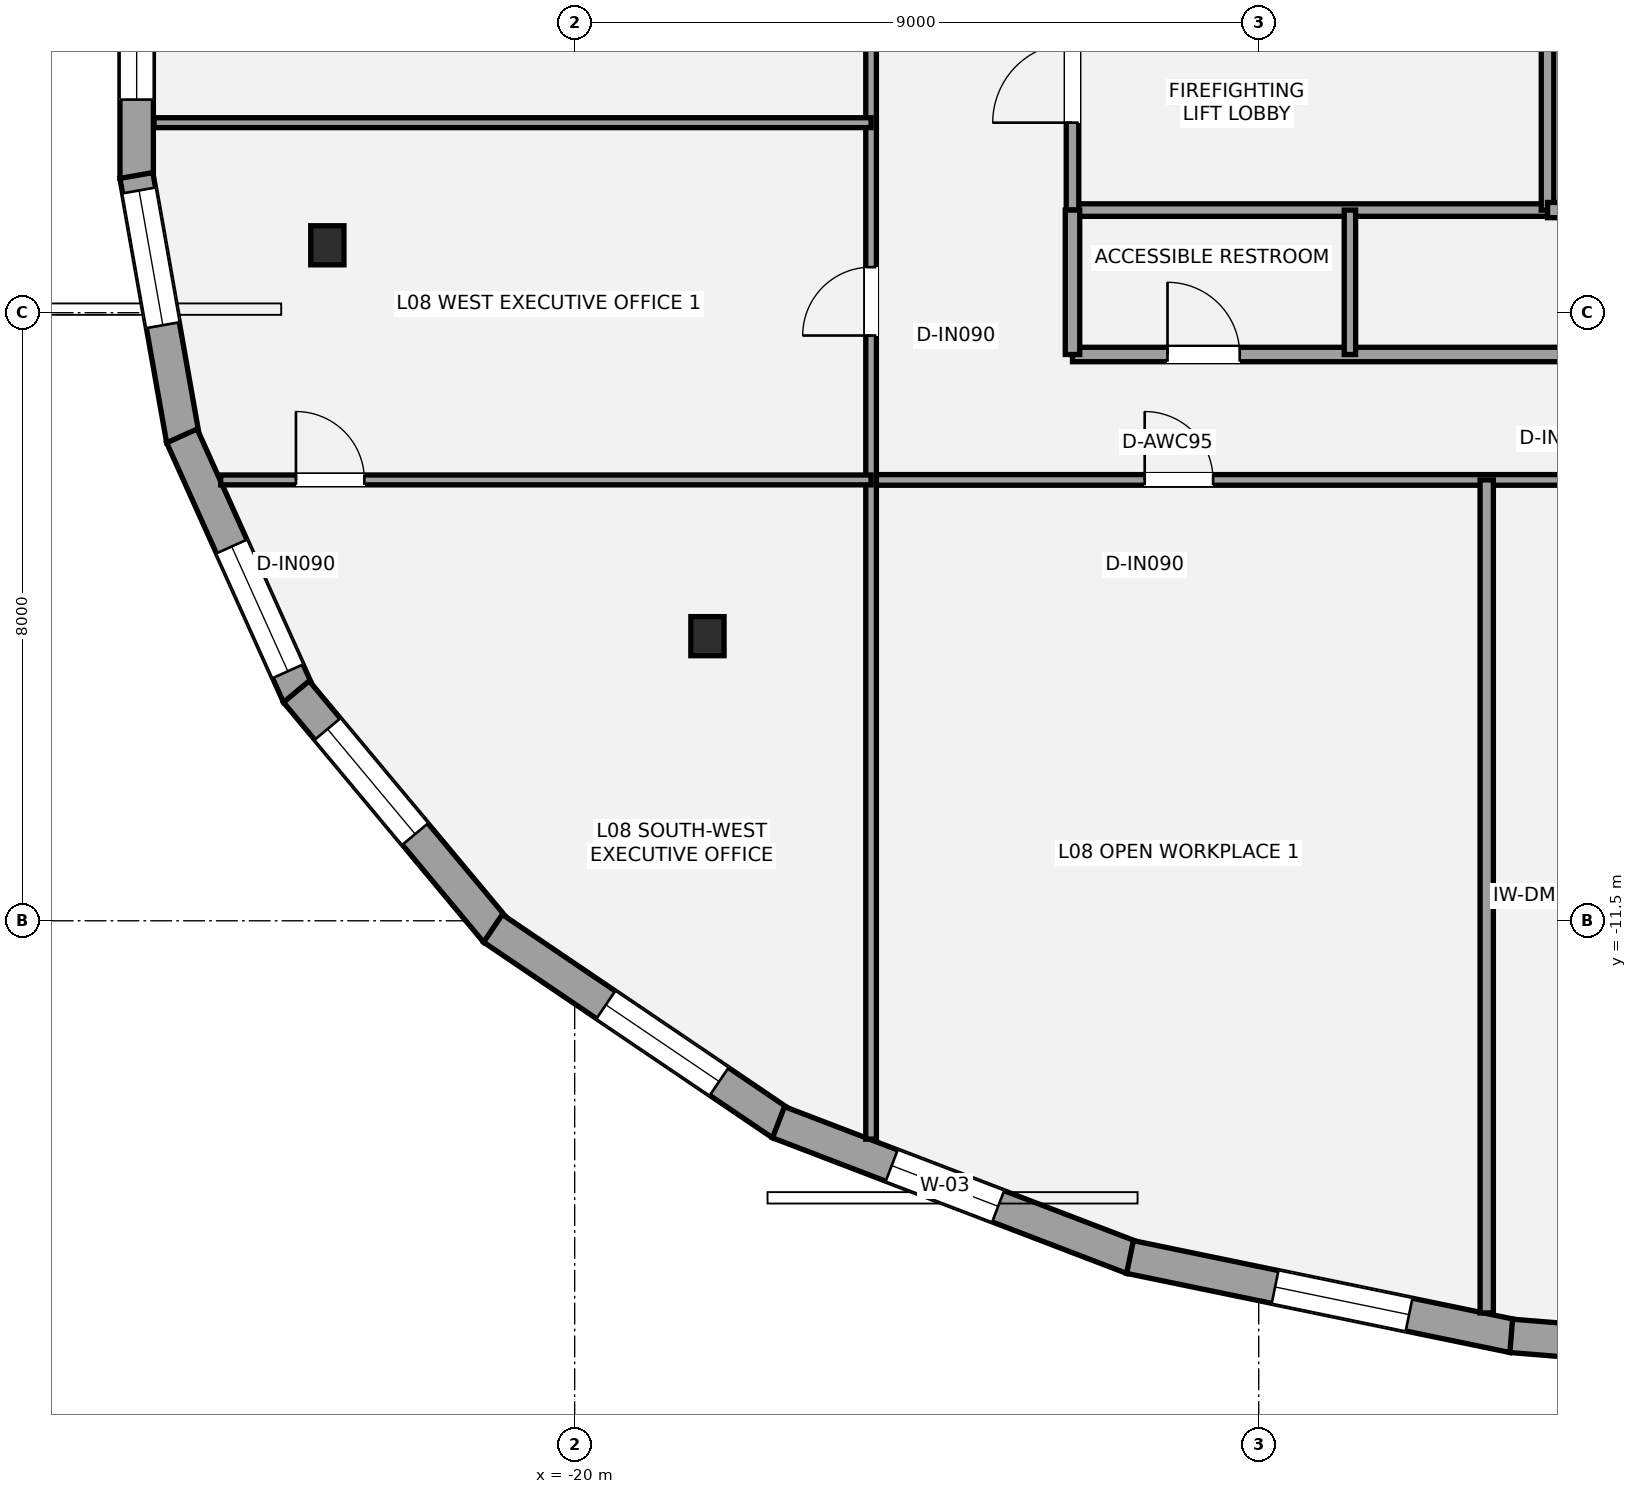
"""IFC4 building model, lengths in metres.
Left out: names, types, materials, properties, quantities, classifications, styles, units other than length and angle.
Written with IfcOpenShell. Run it as: python <this file> out.ifc"""

import sys

from ifc_helpers import new_model, si_unit, direction, frame, frame_2d, origin, origin_2d, place, context, subcontext, project, spatial, rectangle, i_section, extrude, element, fill, save


model = new_model("IFC4")
c1 = context("Model", 3, precision=1e-05, world=origin(), true_north=direction((0.0, 1.0)))
c2 = subcontext(c1, "Body", "Model", "MODEL_VIEW")
j1 = project(units=[si_unit("LENGTHUNIT", "METRE"), si_unit("PLANEANGLEUNIT", "RADIAN")], contexts=[c1])
p1 = place(None, origin())
s1 = spatial("IfcSite", under=j1, at=p1, CompositionType="ELEMENT")
p2 = place(p1, origin())
s2 = spatial("IfcBuilding", under=s1, at=p2, CompositionType="ELEMENT")
p3 = place(p2, frame((0.0, 0.0, 34.2)))
s3 = spatial("IfcBuildingStorey", under=s2, at=p3, CompositionType="ELEMENT", Elevation=34.2)
for number, where, z_axis, x_axis in (
    (1, (-23.254, -2.613, 0.0), (0.0, 0.0, 1.0), (1.0, 0.0, 0.0)),
    (2, (-18.253, -7.756, 0.0), (0.0, 0.0, 1.0), (1.0, 0.0, 0.0)),
):
    element("IfcColumn", number, at=place(p3, frame(where, z_axis=z_axis, x_axis=x_axis)), inside=s3, PredefinedType="COLUMN", context=c2, shape_type="SweptSolid", body=[
        extrude(i_section(OverallWidth=0.437, OverallDepth=0.514, WebThickness=0.061, FlangeThickness=0.097, at=origin_2d()), origin(), (0.0, 0.0, 1.0), 3.6),
    ])
p4 = place(p3, frame((-25.763, -1.733, 0.0), z_axis=(0.0, 0.0, 1.0), x_axis=(0.0, 1.0, 0.0)))
e3 = element("IfcWall", 3, at=p4, inside=s3, PredefinedType="STANDARD", context=c2, shape_type="SweptSolid", body=[
    extrude(rectangle(XDim=3.466, YDim=0.44, at=frame_2d((1.733, 0.0))), origin(), (0.0, 0.0, 1.0), 2.533),
])
p5 = place(p4, frame((1.037, 0.0, 0.58)))
e4 = element("IfcOpeningElement", 4, at=p5, cuts=e3, PredefinedType="OPENING", context=c2, shape_type="SweptSolid", body=[
    extrude(rectangle(XDim=0.9, YDim=1.35, at=frame_2d((0.45, 0.675))), frame((0.0, 0.23, 0.0), z_axis=(0.0, -1.0, 0.0), x_axis=(1.0, 0.0, 0.0)), (0.0, 0.0, 1.0), 0.46),
])
p6 = place(p3, frame((-25.152, -5.173, 0.0), z_axis=(0.0, 0.0, 1.0), x_axis=(-0.174041624961, 0.984738296595, 0.0)))
e5 = element("IfcWall", 5, at=p6, inside=s3, PredefinedType="STANDARD", context=c2, shape_type="SweptSolid", body=[
    extrude(rectangle(XDim=3.532, YDim=0.44, at=frame_2d((1.766, 0.0))), origin(), (0.0, 0.0, 1.0), 2.533),
])
p7 = place(p6, frame((1.532, 0.0, 0.65)))
e6 = element("IfcOpeningElement", 6, at=p7, cuts=e5, PredefinedType="OPENING", context=c2, shape_type="SweptSolid", body=[
    extrude(rectangle(XDim=1.8, YDim=1.7, at=frame_2d((0.9, 0.85))), frame((0.0, 0.23, 0.0), z_axis=(0.0, -1.0, 0.0), x_axis=(1.0, 0.0, 0.0)), (0.0, 0.0, 1.0), 0.46),
])
p8 = place(p3, frame((-23.631, -8.536, 0.0), z_axis=(0.0, 0.0, 1.0), x_axis=(-0.410386362845, 0.911911746383, 0.0)))
e7 = element("IfcWall", 7, at=p8, inside=s3, PredefinedType="STANDARD", context=c2, shape_type="SweptSolid", body=[
    extrude(rectangle(XDim=3.745, YDim=0.44, at=frame_2d((1.873, 0.0))), origin(), (0.0, 0.0, 1.0), 2.533),
])
p9 = place(p8, frame((0.35, 0.0, 0.65)))
e8 = element("IfcOpeningElement", 8, at=p9, cuts=e7, PredefinedType="OPENING", context=c2, shape_type="SweptSolid", body=[
    extrude(rectangle(XDim=1.8, YDim=1.7, at=frame_2d((0.9, 0.85))), frame((0.0, 0.23, 0.0), z_axis=(0.0, -1.0, 0.0), x_axis=(1.0, 0.0, 0.0)), (0.0, 0.0, 1.0), 0.46),
])
p10 = place(p3, frame((-21.029, -11.641, 0.0), z_axis=(0.0, 0.0, 1.0), x_axis=(-0.64070435578, 0.767787684509, 0.0)))
e9 = element("IfcWall", 9, at=p10, inside=s3, PredefinedType="STANDARD", context=c2, shape_type="SweptSolid", body=[
    extrude(rectangle(XDim=4.109, YDim=0.44, at=frame_2d((2.055, 0.0))), origin(), (0.0, 0.0, 1.0), 2.533),
])
p11 = place(p10, frame((1.669, 0.0, 0.65)))
e10 = element("IfcOpeningElement", 10, at=p11, cuts=e9, PredefinedType="OPENING", context=c2, shape_type="SweptSolid", body=[
    extrude(rectangle(XDim=1.8, YDim=1.7, at=frame_2d((0.9, 0.85))), frame((0.0, 0.23, 0.0), z_axis=(0.0, -1.0, 0.0), x_axis=(1.0, 0.0, 0.0)), (0.0, 0.0, 1.0), 0.46),
])
p12 = place(p3, frame((-17.274, -14.174, 0.0), z_axis=(0.0, 0.0, 1.0), x_axis=(-0.828003115717, 0.560723497246, 0.0)))
e11 = element("IfcWall", 11, at=p12, inside=s3, PredefinedType="STANDARD", context=c2, shape_type="SweptSolid", body=[
    extrude(rectangle(XDim=4.591, YDim=0.44, at=frame_2d((2.295, 0.0))), origin(), (0.0, 0.0, 1.0), 2.529),
])
p13 = place(p12, frame((0.997, 0.0, 0.65)))
e12 = element("IfcOpeningElement", 12, at=p13, cuts=e11, PredefinedType="OPENING", context=c2, shape_type="SweptSolid", body=[
    extrude(rectangle(XDim=1.8, YDim=1.7, at=frame_2d((0.9, 0.85))), frame((0.0, 0.23, 0.0), z_axis=(0.0, -1.0, 0.0), x_axis=(1.0, 0.0, 0.0)), (0.0, 0.0, 1.0), 0.46),
])
p14 = place(p3, frame((-12.659, -15.934, 0.0), z_axis=(0.0, 0.0, 1.0), x_axis=(-0.933928375579, 0.357460192592, 0.0)))
e13 = element("IfcWall", 13, at=p14, inside=s3, PredefinedType="STANDARD", context=c2, shape_type="SweptSolid", body=[
    extrude(rectangle(XDim=4.989, YDim=0.44, at=frame_2d((2.494, 0.0))), origin(), (0.0, 0.0, 1.0), 2.529),
])
p15 = place(p14, frame((1.894, 0.0, 0.65)))
e14 = element("IfcOpeningElement", 14, at=p15, cuts=e13, PredefinedType="OPENING", context=c2, shape_type="SweptSolid", body=[
    extrude(rectangle(XDim=1.5, YDim=1.7, at=frame_2d((0.75, 0.85))), frame((0.0, 0.23, 0.0), z_axis=(0.0, -1.0, 0.0), x_axis=(1.0, 0.0, 0.0)), (0.0, 0.0, 1.0), 0.46),
])
p16 = place(p3, frame((-7.651, -16.965, 0.0), z_axis=(0.0, 0.0, 1.0), x_axis=(-0.979349207435, 0.202175987437, 0.0)))
e15 = element("IfcWall", 15, at=p16, inside=s3, PredefinedType="STANDARD", context=c2, shape_type="SweptSolid", body=[
    extrude(rectangle(XDim=5.149, YDim=0.44, at=frame_2d((2.575, 0.0))), origin(), (0.0, 0.0, 1.0), 2.533),
])
p17 = place(p16, frame((1.4, 0.0, 0.65)))
e16 = element("IfcOpeningElement", 16, at=p17, cuts=e15, PredefinedType="OPENING", context=c2, shape_type="SweptSolid", body=[
    extrude(rectangle(XDim=1.8, YDim=1.7, at=frame_2d((0.9, 0.85))), frame((0.0, 0.23, 0.0), z_axis=(0.0, -1.0, 0.0), x_axis=(1.0, 0.0, 0.0)), (0.0, 0.0, 1.0), 0.46),
])
p18 = place(p3, frame((-2.541, -17.377, 0.0), z_axis=(0.0, 0.0, 1.0), x_axis=(-0.996732038622, 0.080778977367, 0.0)))
e17 = element("IfcWall", 17, at=p18, inside=s3, PredefinedType="STANDARD", context=c2, shape_type="SweptSolid", body=[
    extrude(rectangle(XDim=5.153, YDim=0.44, at=frame_2d((2.577, 0.0))), origin(), (0.0, 0.0, 1.0), 2.533),
])
p19 = place(p18, frame((1.972, 0.0, 0.65)))
e18 = element("IfcOpeningElement", 18, at=p19, cuts=e17, PredefinedType="OPENING", context=c2, shape_type="SweptSolid", body=[
    extrude(rectangle(XDim=1.8, YDim=1.7, at=frame_2d((0.9, 0.85))), frame((0.0, 0.23, 0.0), z_axis=(0.0, -1.0, 0.0), x_axis=(1.0, 0.0, 0.0)), (0.0, 0.0, 1.0), 0.46),
])
p20 = place(p3, frame((-13.45, -2.15, 0.0), z_axis=(0.0, 0.0, 1.0), x_axis=(1.0, 0.0, 0.0)))
e19 = element("IfcWall", 19, at=p20, inside=s3, PredefinedType="PARTITIONING", context=c2, shape_type="SweptSolid", body=[
    extrude(rectangle(XDim=6.25, YDim=0.165, at=frame_2d((3.125, 0.0))), origin(), (0.0, 0.0, 1.0), 3.4),
])
p21 = place(p3, frame((-13.45, -2.15, 0.0), z_axis=(0.0, 0.0, 1.0), x_axis=(0.0, 1.0, 0.0)))
e20 = element("IfcWall", 20, at=p21, inside=s3, PredefinedType="PARTITIONING", context=c2, shape_type="SweptSolid", body=[
    extrude(rectangle(XDim=3.15, YDim=0.165, at=frame_2d((1.575, 0.0))), origin(), (0.0, 0.0, 1.0), 2.853),
])
p22 = place(p21, frame((1.15, 0.0, 0.0)))
e21 = element("IfcOpeningElement", 21, at=p22, cuts=e20, PredefinedType="OPENING", context=c2, shape_type="SweptSolid", body=[
    extrude(rectangle(XDim=1.05, YDim=2.15, at=frame_2d((0.525, 1.075))), frame((0.0, 0.093, 0.0), z_axis=(0.0, -1.0, 0.0), x_axis=(1.0, 0.0, 0.0)), (0.0, 0.0, 1.0), 0.185),
])
p23 = place(p3, frame((-7.2, -2.15, 0.0), z_axis=(0.0, 0.0, 1.0), x_axis=(0.0, 1.0, 0.0)))
e22 = element("IfcWall", 22, at=p23, inside=s3, PredefinedType="PARTITIONING", context=c2, shape_type="SweptSolid", body=[
    extrude(rectangle(XDim=3.15, YDim=0.165, at=frame_2d((1.575, 0.0))), origin(), (0.0, 0.0, 1.0), 3.4),
])
p24 = place(p3, frame((-7.2, -2.15, 0.0), z_axis=(0.0, 0.0, 1.0), x_axis=(1.0, 0.0, 0.0)))
e23 = element("IfcWall", 23, at=p24, inside=s3, PredefinedType="SOLIDWALL", context=c2, shape_type="SweptSolid", body=[
    extrude(rectangle(XDim=2.25, YDim=0.2, at=frame_2d((1.125, 0.0))), origin(), (0.0, 0.0, 1.0), 3.4),
])
p25 = place(p3, frame((-13.45, -4.05, 0.0), z_axis=(0.0, 0.0, 1.0), x_axis=(1.0, 0.0, 0.0)))
e24 = element("IfcWall", 24, at=p25, inside=s3, PredefinedType="PLUMBINGWALL", context=c2, shape_type="SweptSolid", body=[
    extrude(rectangle(XDim=11.35, YDim=0.19, at=frame_2d((5.675, 0.0))), origin(), (0.0, 0.0, 1.0), 2.933),
])
p26 = place(p25, frame((1.25, 0.0, 0.0)))
e25 = element("IfcOpeningElement", 25, at=p26, cuts=e24, PredefinedType="OPENING", context=c2, shape_type="SweptSolid", body=[
    extrude(rectangle(XDim=0.95, YDim=2.15, at=frame_2d((0.475, 1.075))), frame((0.0, 0.105, 0.0), z_axis=(0.0, -1.0, 0.0), x_axis=(1.0, 0.0, 0.0)), (0.0, 0.0, 1.0), 0.21),
])
p27 = place(p25, frame((6.4, 0.0, 0.0)))
e26 = element("IfcOpeningElement", 26, at=p27, cuts=e24, PredefinedType="OPENING", context=c2, shape_type="SweptSolid", body=[
    extrude(rectangle(XDim=0.9, YDim=2.1, at=frame_2d((0.45, 1.05))), frame((0.0, 0.105, 0.0), z_axis=(0.0, -1.0, 0.0), x_axis=(1.0, 0.0, 0.0)), (0.0, 0.0, 1.0), 0.21),
])
p28 = place(p3, frame((-13.45, -4.05, 0.0), z_axis=(0.0, 0.0, 1.0), x_axis=(0.0, 1.0, 0.0)))
e27 = element("IfcWall", 27, at=p28, inside=s3, PredefinedType="PLUMBINGWALL", context=c2, shape_type="SweptSolid", body=[
    extrude(rectangle(XDim=1.9, YDim=0.19, at=frame_2d((0.95, 0.0))), origin(), (0.0, 0.0, 1.0), 2.853),
])
p29 = place(p3, frame((-9.8, -4.05, 0.0), z_axis=(0.0, 0.0, 1.0), x_axis=(0.0, 1.0, 0.0)))
e28 = element("IfcWall", 28, at=p29, inside=s3, PredefinedType="PLUMBINGWALL", context=c2, shape_type="SweptSolid", body=[
    extrude(rectangle(XDim=1.9, YDim=0.15, at=frame_2d((0.95, 0.0))), origin(), (0.0, 0.0, 1.0), 3.4),
])
p30 = place(p3, frame((-16.1, -5.7, 0.0), z_axis=(0.0, 0.0, 1.0), x_axis=(1.0, 0.0, 0.0)))
e29 = element("IfcWall", 29, at=p30, inside=s3, PredefinedType="PARTITIONING", context=c2, shape_type="SweptSolid", body=[
    extrude(rectangle(XDim=32.2, YDim=0.14, at=frame_2d((16.1, 0.0))), origin(), (0.0, 0.0, 1.0), 2.853),
])
p31 = place(p30, frame((3.6, 0.0, 0.0)))
e30 = element("IfcOpeningElement", 30, at=p31, cuts=e29, PredefinedType="OPENING", context=c2, shape_type="SweptSolid", body=[
    extrude(rectangle(XDim=0.9, YDim=2.1, at=frame_2d((0.45, 1.05))), frame((0.0, 0.08, 0.0), z_axis=(0.0, -1.0, 0.0), x_axis=(1.0, 0.0, 0.0)), (0.0, 0.0, 1.0), 0.16),
])
p32 = place(p30, frame((11.35, 0.0, 0.0)))
e31 = element("IfcOpeningElement", 31, at=p32, cuts=e29, PredefinedType="OPENING", context=c2, shape_type="SweptSolid", body=[
    extrude(rectangle(XDim=1.5, YDim=2.15, at=frame_2d((0.75, 1.075))), frame((0.0, 0.08, 0.0), z_axis=(0.0, -1.0, 0.0), x_axis=(1.0, 0.0, 0.0)), (0.0, 0.0, 1.0), 0.16),
])
p33 = place(p30, frame((19.65, 0.0, 0.0)))
e32 = element("IfcOpeningElement", 32, at=p33, cuts=e29, PredefinedType="OPENING", context=c2, shape_type="SweptSolid", body=[
    extrude(rectangle(XDim=0.9, YDim=2.1, at=frame_2d((0.45, 1.05))), frame((0.0, 0.08, 0.0), z_axis=(0.0, -1.0, 0.0), x_axis=(1.0, 0.0, 0.0)), (0.0, 0.0, 1.0), 0.16),
])
p34 = place(p30, frame((27.7, 0.0, 0.0)))
e33 = element("IfcOpeningElement", 33, at=p34, cuts=e29, PredefinedType="OPENING", context=c2, shape_type="SweptSolid", body=[
    extrude(rectangle(XDim=0.9, YDim=2.1, at=frame_2d((0.45, 1.05))), frame((0.0, 0.08, 0.0), z_axis=(0.0, -1.0, 0.0), x_axis=(1.0, 0.0, 0.0)), (0.0, 0.0, 1.0), 0.16),
])
p35 = place(p3, frame((-16.1, -14.373, 0.0), z_axis=(0.0, 0.0, 1.0), x_axis=(0.0, 1.0, 0.0)))
e34 = element("IfcWall", 34, at=p35, inside=s3, PredefinedType="PARTITIONING", context=c2, shape_type="SweptSolid", body=[
    extrude(rectangle(XDim=20.223, YDim=0.14, at=frame_2d((10.111, 0.0))), origin(), (0.0, 0.0, 1.0), 2.841),
])
p36 = place(p35, frame((10.573, 0.0, 0.0)))
e35 = element("IfcOpeningElement", 35, at=p36, cuts=e34, PredefinedType="OPENING", context=c2, shape_type="SweptSolid", body=[
    extrude(rectangle(XDim=0.9, YDim=2.1, at=frame_2d((0.45, 1.05))), frame((0.0, 0.08, 0.0), z_axis=(0.0, -1.0, 0.0), x_axis=(1.0, 0.0, 0.0)), (0.0, 0.0, 1.0), 0.16),
])
p37 = place(p35, frame((16.347, 0.0, 0.0)))
e36 = element("IfcOpeningElement", 36, at=p37, cuts=e34, PredefinedType="OPENING", context=c2, shape_type="SweptSolid", body=[
    extrude(rectangle(XDim=0.9, YDim=2.1, at=frame_2d((0.45, 1.05))), frame((0.0, 0.08, 0.0), z_axis=(0.0, -1.0, 0.0), x_axis=(1.0, 0.0, 0.0)), (0.0, 0.0, 1.0), 0.16),
])
p38 = place(p3, frame((-8.0, -16.66, 0.0), z_axis=(0.0, 0.0, 1.0), x_axis=(0.0, 1.0, 0.0)))
e37 = element("IfcWall", 37, at=p38, inside=s3, PredefinedType="PARTITIONING", context=c2, shape_type="SweptSolid", body=[
    extrude(rectangle(XDim=10.96, YDim=0.175, at=frame_2d((5.48, 0.0))), origin(), (0.0, 0.0, 1.0), 2.853),
])
p39 = place(p3, frame((-24.657, -5.7, 0.0), z_axis=(0.0, 0.0, 1.0), x_axis=(1.0, 0.0, 0.0)))
e38 = element("IfcWall", 38, at=p39, inside=s3, PredefinedType="PARTITIONING", context=c2, shape_type="SweptSolid", body=[
    extrude(rectangle(XDim=8.557, YDim=0.13, at=frame_2d((4.278, 0.0))), origin(), (0.0, 0.0, 1.0), 2.779),
])
p40 = place(p39, frame((0.99, 0.0, 0.0)))
e39 = element("IfcOpeningElement", 39, at=p40, cuts=e38, PredefinedType="OPENING", context=c2, shape_type="SweptSolid", body=[
    extrude(rectangle(XDim=0.9, YDim=2.1, at=frame_2d((0.45, 1.05))), frame((0.0, 0.075, 0.0), z_axis=(0.0, -1.0, 0.0), x_axis=(1.0, 0.0, 0.0)), (0.0, 0.0, 1.0), 0.15),
])
p41 = place(p3, frame((-25.535, -1.0, 0.0), z_axis=(0.0, 0.0, 1.0), x_axis=(1.0, 0.0, 0.0)))
e40 = element("IfcWall", 40, at=p41, inside=s3, PredefinedType="PARTITIONING", context=c2, shape_type="SweptSolid", body=[
    extrude(rectangle(XDim=9.435, YDim=0.13, at=frame_2d((4.717, 0.0))), origin(), (0.0, 0.0, 1.0), 2.841),
])
p42 = place(p5, origin())
e41 = element("IfcWindow", 41, at=p42, inside=s3, PartitioningType="SINGLE_PANEL", PredefinedType="WINDOW", context=c2, shape_type="SweptSolid", body=[
    extrude(rectangle(XDim=0.9, YDim=1.35, at=frame_2d((0.45, 0.675))), frame((0.0, -0.01, 0.0), z_axis=(0.0, -1.0, 0.0), x_axis=(1.0, 0.0, 0.0)), (0.0, 0.0, 1.0), 0.06),
])
fill(e4, e41)
p43 = place(p7, origin())
e42 = element("IfcWindow", 42, at=p43, inside=s3, PartitioningType="SINGLE_PANEL", PredefinedType="WINDOW", context=c2, shape_type="SweptSolid", body=[
    extrude(rectangle(XDim=1.8, YDim=1.7, at=frame_2d((0.9, 0.85))), frame((0.0, -0.01, 0.0), z_axis=(0.0, -1.0, 0.0), x_axis=(1.0, 0.0, 0.0)), (0.0, 0.0, 1.0), 0.06),
])
fill(e6, e42)
p44 = place(p9, origin())
e43 = element("IfcWindow", 43, at=p44, inside=s3, PartitioningType="SINGLE_PANEL", PredefinedType="WINDOW", context=c2, shape_type="SweptSolid", body=[
    extrude(rectangle(XDim=1.8, YDim=1.7, at=frame_2d((0.9, 0.85))), frame((0.0, -0.01, 0.0), z_axis=(0.0, -1.0, 0.0), x_axis=(1.0, 0.0, 0.0)), (0.0, 0.0, 1.0), 0.06),
])
fill(e8, e43)
p45 = place(p11, origin())
e44 = element("IfcWindow", 44, at=p45, inside=s3, PartitioningType="SINGLE_PANEL", PredefinedType="WINDOW", context=c2, shape_type="SweptSolid", body=[
    extrude(rectangle(XDim=1.8, YDim=1.7, at=frame_2d((0.9, 0.85))), frame((0.0, -0.01, 0.0), z_axis=(0.0, -1.0, 0.0), x_axis=(1.0, 0.0, 0.0)), (0.0, 0.0, 1.0), 0.06),
])
fill(e10, e44)
p46 = place(p13, origin())
e45 = element("IfcWindow", 45, at=p46, inside=s3, PartitioningType="SINGLE_PANEL", PredefinedType="WINDOW", context=c2, shape_type="SweptSolid", body=[
    extrude(rectangle(XDim=1.8, YDim=1.7, at=frame_2d((0.9, 0.85))), frame((0.0, -0.01, 0.0), z_axis=(0.0, -1.0, 0.0), x_axis=(1.0, 0.0, 0.0)), (0.0, 0.0, 1.0), 0.06),
])
fill(e12, e45)
p47 = place(p15, origin())
e46 = element("IfcWindow", 46, at=p47, inside=s3, PartitioningType="SINGLE_PANEL", PredefinedType="WINDOW", context=c2, shape_type="SweptSolid", body=[
    extrude(rectangle(XDim=1.5, YDim=1.7, at=frame_2d((0.75, 0.85))), frame((0.0, -0.01, 0.0), z_axis=(0.0, -1.0, 0.0), x_axis=(1.0, 0.0, 0.0)), (0.0, 0.0, 1.0), 0.06),
])
fill(e14, e46)
p48 = place(p17, origin())
e47 = element("IfcWindow", 47, at=p48, inside=s3, PartitioningType="SINGLE_PANEL", PredefinedType="WINDOW", context=c2, shape_type="SweptSolid", body=[
    extrude(rectangle(XDim=1.8, YDim=1.7, at=frame_2d((0.9, 0.85))), frame((0.0, -0.01, 0.0), z_axis=(0.0, -1.0, 0.0), x_axis=(1.0, 0.0, 0.0)), (0.0, 0.0, 1.0), 0.06),
])
fill(e16, e47)
p49 = place(p22, origin())
e48 = element("IfcDoor", 48, at=p49, inside=s3, OperationType="SINGLE_SWING_LEFT", PredefinedType="DOOR", context=c2, shape_type="SweptSolid", body=[
    extrude(rectangle(XDim=1.05, YDim=2.15, at=frame_2d((0.525, 1.075))), frame((0.0, 0.025, 0.0), z_axis=(0.0, -1.0, 0.0), x_axis=(1.0, 0.0, 0.0)), (0.0, 0.0, 1.0), 0.05),
])
fill(e21, e48)
p50 = place(p26, origin())
e49 = element("IfcDoor", 49, at=p50, inside=s3, OperationType="SINGLE_SWING_LEFT", PredefinedType="DOOR", context=c2, shape_type="SweptSolid", body=[
    extrude(rectangle(XDim=0.95, YDim=2.15, at=frame_2d((0.475, 1.075))), frame((0.0, 0.025, 0.0), z_axis=(0.0, -1.0, 0.0), x_axis=(1.0, 0.0, 0.0)), (0.0, 0.0, 1.0), 0.05),
])
fill(e25, e49)
p51 = place(p31, origin())
e50 = element("IfcDoor", 50, at=p51, inside=s3, OperationType="SINGLE_SWING_LEFT", PredefinedType="DOOR", context=c2, shape_type="SweptSolid", body=[
    extrude(rectangle(XDim=0.9, YDim=2.1, at=frame_2d((0.45, 1.05))), frame((0.0, 0.025, 0.0), z_axis=(0.0, -1.0, 0.0), x_axis=(1.0, 0.0, 0.0)), (0.0, 0.0, 1.0), 0.05),
])
fill(e30, e50)
p52 = place(p40, origin())
e51 = element("IfcDoor", 51, at=p52, inside=s3, OperationType="SINGLE_SWING_LEFT", PredefinedType="DOOR", context=c2, shape_type="SweptSolid", body=[
    extrude(rectangle(XDim=0.9, YDim=2.1, at=frame_2d((0.45, 1.05))), frame((0.0, 0.025, 0.0), z_axis=(0.0, -1.0, 0.0), x_axis=(1.0, 0.0, 0.0)), (0.0, 0.0, 1.0), 0.05),
])
fill(e39, e51)
p53 = place(p36, origin())
e52 = element("IfcDoor", 52, at=p53, inside=s3, OperationType="SINGLE_SWING_LEFT", PredefinedType="DOOR", context=c2, shape_type="SweptSolid", body=[
    extrude(rectangle(XDim=0.9, YDim=2.1, at=frame_2d((0.45, 1.05))), frame((0.0, 0.025, 0.0), z_axis=(0.0, -1.0, 0.0), x_axis=(1.0, 0.0, 0.0)), (0.0, 0.0, 1.0), 0.05),
])
fill(e35, e52)
save(model, sys.argv[1])
